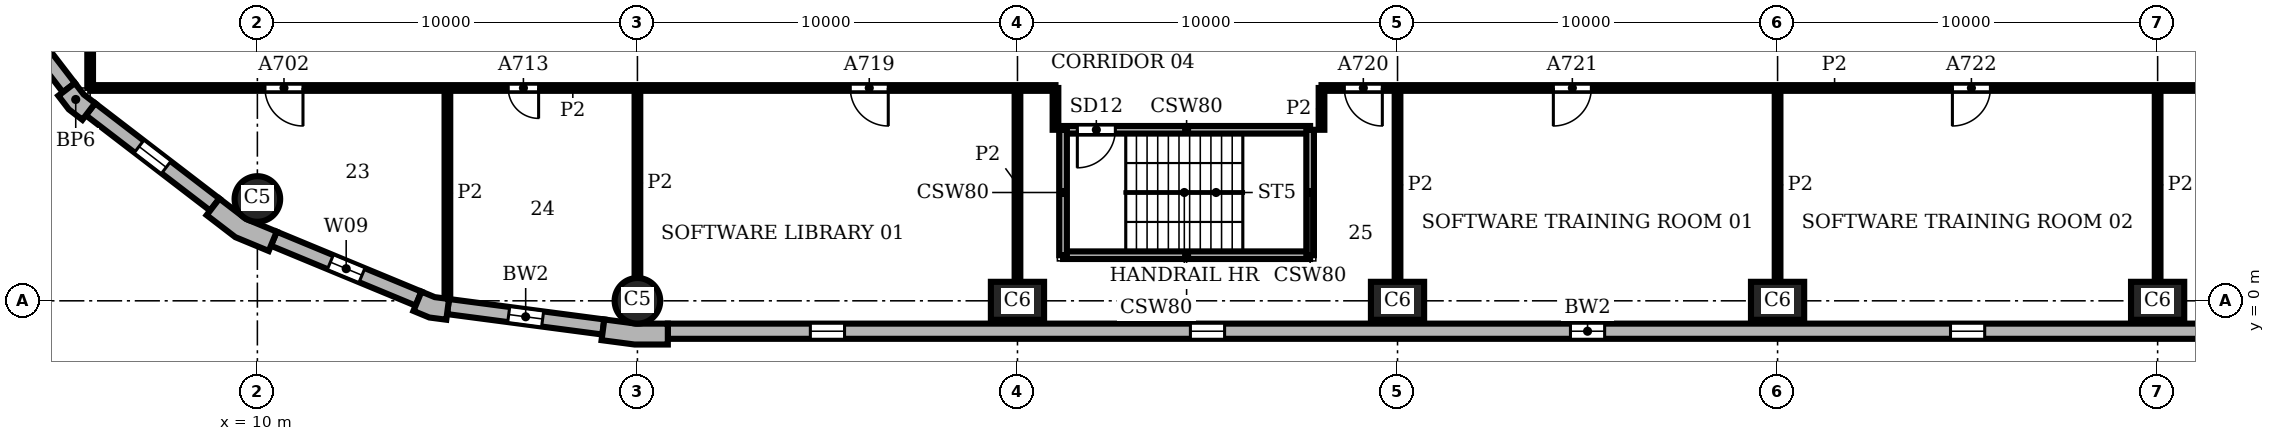
"""IFC4 building model, lengths in metres.
Left out: names, types, materials, properties, quantities, classifications, styles, units other than length and angle.
Written with IfcOpenShell. Run it as: python <this file> out.ifc"""

import sys

from ifc_helpers import new_model, si_unit, direction, frame, frame_2d, origin, origin_2d, place, context, subcontext, project, spatial, polyline, rectangle, circle, outline, extrude, element, fill, save


model = new_model("IFC4")
c1 = context("Model", 3, precision=1e-05, world=origin(), true_north=direction((0.0, 1.0)))
c2 = subcontext(c1, "Body", "Model", "MODEL_VIEW")
j1 = project(units=[si_unit("LENGTHUNIT", "METRE"), si_unit("PLANEANGLEUNIT", "RADIAN")], contexts=[c1])
p1 = place(None, origin())
s1 = spatial("IfcSite", under=j1, at=p1, CompositionType="ELEMENT")
p2 = place(p1, origin())
s2 = spatial("IfcBuilding", under=s1, at=p2, CompositionType="ELEMENT")
p3 = place(p2, frame((0.0, 0.0, 82.2)))
s3 = spatial("IfcBuildingStorey", under=s2, at=p3, CompositionType="ELEMENT", Elevation=82.2)
p4 = place(p3, frame((20.0, 0.0, 0.0), z_axis=(0.0, 0.0, 1.0), x_axis=(1.0, 0.0, 0.0)))
e1 = element("IfcColumn", 1, at=p4, inside=s3, PredefinedType="COLUMN", context=c2, shape_type="SweptSolid", body=[
    extrude(circle(Radius=0.6, at=origin_2d()), origin(), (0.0, 0.0, 1.0), 3.9),
])
for number, where, z_axis, x_axis in (
    (2, (30.0, 0.0, 0.0), (0.0, 0.0, 1.0), (1.0, 0.0, 0.0)),
    (3, (40.0, 0.0, 0.0), (0.0, 0.0, 1.0), (1.0, 0.0, 0.0)),
    (4, (50.0, 0.0, 0.0), (0.0, 0.0, 1.0), (1.0, 0.0, 0.0)),
    (5, (60.0, 0.0, 0.0), (0.0, 0.0, 1.0), (1.0, 0.0, 0.0)),
):
    element("IfcColumn", number, at=place(p3, frame(where, z_axis=z_axis, x_axis=x_axis)), inside=s3, PredefinedType="COLUMN", context=c2, shape_type="SweptSolid", body=[
        extrude(rectangle(XDim=1.4, YDim=1.0, at=origin_2d()), origin(), (0.0, 0.0, 1.0), 3.9),
    ])
p5 = place(p3, frame((10.0, 2.679, 0.0), z_axis=(0.0, 0.0, 1.0), x_axis=(1.0, 0.0, 0.0)))
e6 = element("IfcColumn", 6, at=p5, inside=s3, PredefinedType="COLUMN", context=c2, shape_type="SweptSolid", body=[
    extrude(circle(Radius=0.6, at=origin_2d()), origin(), (0.0, 0.0, 1.0), 3.9),
])
p6 = place(p3, origin())
e7 = element("IfcWall", 7, at=p6, inside=s3, PredefinedType="SOLIDWALL", context=c2, shape_type="SweptSolid", body=[
    extrude(outline(polyline([(19.076, -0.887), (19.057, -1.036), (19.925, -1.15), (20.8, -1.15), (20.8, -1.0), (20.8, -0.6), (19.961, -0.6), (19.128, -0.49), (19.076, -0.887)])), origin(), (0.0, 0.0, 1.0), 3.9),
])
e8 = element("IfcWall", 8, at=p6, inside=s3, PredefinedType="SOLIDWALL", context=c2, shape_type="SweptSolid", body=[
    extrude(outline(polyline([(4.882, 5.487), (4.763, 5.396), (5.038, 5.038), (5.396, 4.763), (5.487, 4.882), (5.731, 5.199), (5.43, 5.43), (5.199, 5.731), (4.882, 5.487)])), origin(), (0.0, 0.0, 1.0), 3.9),
])
e9 = element("IfcWall", 9, at=p6, inside=s3, PredefinedType="SOLIDWALL", context=c2, shape_type="SweptSolid", body=[
    extrude(outline(polyline([(8.757, 2.373), (8.665, 2.254), (9.42, 1.675), (10.299, 1.311), (10.356, 1.449), (10.51, 1.819), (9.698, 2.155), (9.0, 2.69), (8.757, 2.373)])), origin(), (0.0, 0.0, 1.0), 3.9),
])
e10 = element("IfcWall", 10, at=p6, inside=s3, PredefinedType="SOLIDWALL", context=c2, shape_type="SweptSolid", body=[
    extrude(outline(polyline([(14.164, -0.128), (14.106, -0.266), (14.523, -0.439), (14.971, -0.498), (14.99, -0.349), (15.043, 0.047), (14.667, 0.097), (14.317, 0.242), (14.164, -0.128)])), origin(), (0.0, 0.0, 1.0), 3.9),
])
p7 = place(p3, frame((20.8, -0.8, 0.0), z_axis=(0.0, 0.0, 1.0), x_axis=(1.0, 0.0, 0.0)))
e11 = element("IfcWall", 11, at=p7, inside=s3, PredefinedType="SOLIDWALL", context=c2, shape_type="SweptSolid", body=[
    extrude(rectangle(XDim=48.4, YDim=0.4, at=frame_2d((24.2, 0.0))), origin(), (0.0, 0.0, 1.0), 3.9),
])
p8 = place(p7, frame((3.75, 0.0, 0.9)))
e12 = element("IfcOpeningElement", 12, at=p8, cuts=e11, PredefinedType="OPENING", context=c2, shape_type="SweptSolid", body=[
    extrude(rectangle(XDim=0.9, YDim=2.35, at=frame_2d((0.45, 1.175))), frame((0.0, 0.21, 0.0), z_axis=(0.0, -1.0, 0.0), x_axis=(1.0, 0.0, 0.0)), (0.0, 0.0, 1.0), 0.42),
])
p9 = place(p7, frame((13.75, 0.0, 0.9)))
e13 = element("IfcOpeningElement", 13, at=p9, cuts=e11, PredefinedType="OPENING", context=c2, shape_type="SweptSolid", body=[
    extrude(rectangle(XDim=0.9, YDim=2.35, at=frame_2d((0.45, 1.175))), frame((0.0, 0.21, 0.0), z_axis=(0.0, -1.0, 0.0), x_axis=(1.0, 0.0, 0.0)), (0.0, 0.0, 1.0), 0.42),
])
p10 = place(p7, frame((23.75, 0.0, 0.9)))
e14 = element("IfcOpeningElement", 14, at=p10, cuts=e11, PredefinedType="OPENING", context=c2, shape_type="SweptSolid", body=[
    extrude(rectangle(XDim=0.9, YDim=2.35, at=frame_2d((0.45, 1.175))), frame((0.0, 0.21, 0.0), z_axis=(0.0, -1.0, 0.0), x_axis=(1.0, 0.0, 0.0)), (0.0, 0.0, 1.0), 0.42),
])
p11 = place(p7, frame((33.75, 0.0, 0.9)))
e15 = element("IfcOpeningElement", 15, at=p11, cuts=e11, PredefinedType="OPENING", context=c2, shape_type="SweptSolid", body=[
    extrude(rectangle(XDim=0.9, YDim=2.35, at=frame_2d((0.45, 1.175))), frame((0.0, 0.21, 0.0), z_axis=(0.0, -1.0, 0.0), x_axis=(1.0, 0.0, 0.0)), (0.0, 0.0, 1.0), 0.42),
])
p12 = place(p7, frame((43.75, 0.0, 0.9)))
e16 = element("IfcOpeningElement", 16, at=p12, cuts=e11, PredefinedType="OPENING", context=c2, shape_type="SweptSolid", body=[
    extrude(rectangle(XDim=0.9, YDim=2.35, at=frame_2d((0.45, 1.175))), frame((0.0, 0.21, 0.0), z_axis=(0.0, -1.0, 0.0), x_axis=(1.0, 0.0, 0.0)), (0.0, 0.0, 1.0), 0.42),
])
p13 = place(p3, frame((2.532, 8.878, 0.0), z_axis=(0.0, 0.0, 1.0), x_axis=(0.608759824817, -0.793354571229, 0.0)))
e17 = element("IfcWall", 17, at=p13, inside=s3, PredefinedType="SOLIDWALL", context=c2, shape_type="SweptSolid", body=[
    extrude(rectangle(XDim=4.121, YDim=0.4, at=frame_2d((2.061, 0.0))), origin(), (0.0, 0.0, 1.0), 3.9),
])
p14 = place(p13, frame((1.611, 0.0, 0.9)))
e18 = element("IfcOpeningElement", 18, at=p14, cuts=e17, PredefinedType="OPENING", context=c2, shape_type="SweptSolid", body=[
    extrude(rectangle(XDim=0.9, YDim=2.35, at=frame_2d((0.45, 1.175))), frame((0.0, 0.21, 0.0), z_axis=(0.0, -1.0, 0.0), x_axis=(1.0, 0.0, 0.0)), (0.0, 0.0, 1.0), 0.42),
])
p15 = place(p3, frame((5.609, 5.041, 0.0), z_axis=(0.0, 0.0, 1.0), x_axis=(0.793354571229, -0.608759824817, 0.0)))
e19 = element("IfcWall", 19, at=p15, inside=s3, PredefinedType="SOLIDWALL", context=c2, shape_type="SweptSolid", body=[
    extrude(rectangle(XDim=4.121, YDim=0.4, at=frame_2d((2.061, 0.0))), origin(), (0.0, 0.0, 1.0), 3.9),
])
p16 = place(p15, frame((1.611, 0.0, 0.9)))
e20 = element("IfcOpeningElement", 20, at=p16, cuts=e19, PredefinedType="OPENING", context=c2, shape_type="SweptSolid", body=[
    extrude(rectangle(XDim=0.9, YDim=2.35, at=frame_2d((0.45, 1.175))), frame((0.0, 0.21, 0.0), z_axis=(0.0, -1.0, 0.0), x_axis=(1.0, 0.0, 0.0)), (0.0, 0.0, 1.0), 0.42),
])
p17 = place(p3, frame((10.433, 1.634, 0.0), z_axis=(0.0, 0.0, 1.0), x_axis=(0.923863744394, -0.382721546029, 0.0)))
e21 = element("IfcWall", 21, at=p17, inside=s3, PredefinedType="SOLIDWALL", context=c2, shape_type="SweptSolid", body=[
    extrude(rectangle(XDim=4.121, YDim=0.4, at=frame_2d((2.061, 0.0))), origin(), (0.0, 0.0, 1.0), 3.9),
])
p18 = place(p17, frame((1.611, 0.0, 0.9)))
e22 = element("IfcOpeningElement", 22, at=p18, cuts=e21, PredefinedType="OPENING", context=c2, shape_type="SweptSolid", body=[
    extrude(rectangle(XDim=0.9, YDim=2.35, at=frame_2d((0.45, 1.175))), frame((0.0, 0.21, 0.0), z_axis=(0.0, -1.0, 0.0), x_axis=(1.0, 0.0, 0.0)), (0.0, 0.0, 1.0), 0.42),
])
p19 = place(p3, frame((15.017, -0.151, 0.0), z_axis=(0.0, 0.0, 1.0), x_axis=(0.991446429508, -0.130514280502, 0.0)))
e23 = element("IfcWall", 23, at=p19, inside=s3, PredefinedType="SOLIDWALL", context=c2, shape_type="SweptSolid", body=[
    extrude(rectangle(XDim=4.121, YDim=0.4, at=frame_2d((2.061, 0.0))), origin(), (0.0, 0.0, 1.0), 3.9),
])
p20 = place(p19, frame((1.611, 0.0, 0.9)))
e24 = element("IfcOpeningElement", 24, at=p20, cuts=e23, PredefinedType="OPENING", context=c2, shape_type="SweptSolid", body=[
    extrude(rectangle(XDim=0.9, YDim=2.35, at=frame_2d((0.45, 1.175))), frame((0.0, 0.21, 0.0), z_axis=(0.0, -1.0, 0.0), x_axis=(1.0, 0.0, 0.0)), (0.0, 0.0, 1.0), 0.42),
])
p21 = place(p3, frame((31.2, 1.2, 0.0), z_axis=(0.0, 0.0, 1.0), x_axis=(1.0, 0.0, 0.0)))
e25 = element("IfcWall", 25, at=p21, inside=s3, PredefinedType="SHEAR", context=c2, shape_type="SweptSolid", body=[
    extrude(rectangle(XDim=6.5, YDim=0.2, at=frame_2d((3.25, 0.0))), origin(), (0.0, 0.0, 1.0), 3.58),
])
p22 = place(p3, frame((31.2, 4.5, 0.0), z_axis=(0.0, 0.0, 1.0), x_axis=(1.0, 0.0, 0.0)))
e26 = element("IfcWall", 26, at=p22, inside=s3, PredefinedType="SHEAR", context=c2, shape_type="SweptSolid", body=[
    extrude(rectangle(XDim=6.5, YDim=0.2, at=frame_2d((3.25, 0.0))), origin(), (0.0, 0.0, 1.0), 3.58),
])
p23 = place(p22, frame((0.375, 0.0, 0.0)))
e27 = element("IfcOpeningElement", 27, at=p23, cuts=e26, PredefinedType="OPENING", context=c2, shape_type="SweptSolid", body=[
    extrude(rectangle(XDim=1.0, YDim=2.1, at=frame_2d((0.5, 1.05))), frame((0.0, 0.11, 0.0), z_axis=(0.0, -1.0, 0.0), x_axis=(1.0, 0.0, 0.0)), (0.0, 0.0, 1.0), 0.22),
])
for number, where, z_axis, x_axis in (
    (28, (31.2, 1.2, 0.0), (0.0, 0.0, 1.0), (0.0, 1.0, 0.0)),
    (29, (37.7, 1.2, 0.0), (0.0, 0.0, 1.0), (0.0, 1.0, 0.0)),
):
    element("IfcWall", number, at=place(p3, frame(where, z_axis=z_axis, x_axis=x_axis)), inside=s3, PredefinedType="SHEAR", context=c2, shape_type="SweptSolid", body=[
        extrude(rectangle(XDim=3.3, YDim=0.2, at=frame_2d((1.65, 0.0))), origin(), (0.0, 0.0, 1.0), 3.58),
    ])
p24 = place(p3, frame((5.6, 5.6, 0.0), z_axis=(0.0, 0.0, 1.0), x_axis=(0.0, 1.0, 0.0)))
e30 = element("IfcWall", 30, at=p24, inside=s3, PredefinedType="PARTITIONING", context=c2, shape_type="SweptSolid", body=[
    extrude(rectangle(XDim=54.4, YDim=0.15, at=frame_2d((27.2, 0.0))), origin(), (0.0, 0.0, 1.0), 3.58),
])
p25 = place(p24, frame((40.8, 0.0, 0.0)))
e31 = element("IfcOpeningElement", 31, at=p25, cuts=e30, PredefinedType="OPENING", context=c2, shape_type="SweptSolid", body=[
    extrude(rectangle(XDim=1.8, YDim=2.1, at=frame_2d((0.9, 1.05))), frame((0.0, 0.085, 0.0), z_axis=(0.0, -1.0, 0.0), x_axis=(1.0, 0.0, 0.0)), (0.0, 0.0, 1.0), 0.17),
])
p26 = place(p3, frame((15.0, 0.063, 0.0), z_axis=(0.0, 0.0, 1.0), x_axis=(0.0, 1.0, 0.0)))
e32 = element("IfcWall", 32, at=p26, inside=s3, PredefinedType="PARTITIONING", context=c2, shape_type="SweptSolid", body=[
    extrude(rectangle(XDim=5.537, YDim=0.15, at=frame_2d((2.769, 0.0))), origin(), (0.0, 0.0, 1.0), 3.58),
])
p27 = place(p3, frame((20.0, 0.6, 0.0), z_axis=(0.0, 0.0, 1.0), x_axis=(0.0, 1.0, 0.0)))
e33 = element("IfcWall", 33, at=p27, inside=s3, PredefinedType="PARTITIONING", context=c2, shape_type="SweptSolid", body=[
    extrude(rectangle(XDim=5.0, YDim=0.15, at=frame_2d((2.5, 0.0))), origin(), (0.0, 0.0, 1.0), 3.58),
])
p28 = place(p3, frame((30.0, 0.5, 0.0), z_axis=(0.0, 0.0, 1.0), x_axis=(0.0, 1.0, 0.0)))
e34 = element("IfcWall", 34, at=p28, inside=s3, PredefinedType="PARTITIONING", context=c2, shape_type="SweptSolid", body=[
    extrude(rectangle(XDim=5.1, YDim=0.15, at=frame_2d((2.55, 0.0))), origin(), (0.0, 0.0, 1.0), 3.58),
])
for number, where, z_axis, x_axis in (
    (35, (31.0, 4.5, 0.0), (0.0, 0.0, 1.0), (0.0, 1.0, 0.0)),
    (36, (38.0, 4.5, 0.0), (0.0, 0.0, 1.0), (0.0, 1.0, 0.0)),
):
    element("IfcWall", number, at=place(p3, frame(where, z_axis=z_axis, x_axis=x_axis)), inside=s3, PredefinedType="PARTITIONING", context=c2, shape_type="SweptSolid", body=[
        extrude(rectangle(XDim=1.1, YDim=0.15, at=frame_2d((0.55, 0.0))), origin(), (0.0, 0.0, 1.0), 3.58),
    ])
for number, where, z_axis, x_axis in (
    (37, (40.0, 0.5, 0.0), (0.0, 0.0, 1.0), (0.0, 1.0, 0.0)),
    (38, (50.0, 0.5, 0.0), (0.0, 0.0, 1.0), (0.0, 1.0, 0.0)),
    (39, (60.0, 0.5, 0.0), (0.0, 0.0, 1.0), (0.0, 1.0, 0.0)),
):
    element("IfcWall", number, at=place(p3, frame(where, z_axis=z_axis, x_axis=x_axis)), inside=s3, PredefinedType="PARTITIONING", context=c2, shape_type="SweptSolid", body=[
        extrude(rectangle(XDim=5.1, YDim=0.15, at=frame_2d((2.55, 0.0))), origin(), (0.0, 0.0, 1.0), 3.58),
    ])
p29 = place(p3, frame((5.6, 5.6, 0.0), z_axis=(0.0, 0.0, 1.0), x_axis=(1.0, 0.0, 0.0)))
e40 = element("IfcWall", 40, at=p29, inside=s3, PredefinedType="PARTITIONING", context=c2, shape_type="SweptSolid", body=[
    extrude(rectangle(XDim=25.4, YDim=0.15, at=frame_2d((12.7, 0.0))), origin(), (0.0, 0.0, 1.0), 3.58),
])
p30 = place(p29, frame((4.6, 0.0, 0.0)))
e41 = element("IfcOpeningElement", 41, at=p30, cuts=e40, PredefinedType="OPENING", context=c2, shape_type="SweptSolid", body=[
    extrude(rectangle(XDim=1.0, YDim=2.1, at=frame_2d((0.5, 1.05))), frame((0.0, 0.085, 0.0), z_axis=(0.0, -1.0, 0.0), x_axis=(1.0, 0.0, 0.0)), (0.0, 0.0, 1.0), 0.17),
])
p31 = place(p29, frame((11.0, 0.0, 0.0)))
e42 = element("IfcOpeningElement", 42, at=p31, cuts=e40, PredefinedType="OPENING", context=c2, shape_type="SweptSolid", body=[
    extrude(rectangle(XDim=0.8, YDim=2.1, at=frame_2d((0.4, 1.05))), frame((0.0, 0.085, 0.0), z_axis=(0.0, -1.0, 0.0), x_axis=(1.0, 0.0, 0.0)), (0.0, 0.0, 1.0), 0.17),
])
p32 = place(p29, frame((20.0, 0.0, 0.0)))
e43 = element("IfcOpeningElement", 43, at=p32, cuts=e40, PredefinedType="OPENING", context=c2, shape_type="SweptSolid", body=[
    extrude(rectangle(XDim=1.0, YDim=2.1, at=frame_2d((0.5, 1.05))), frame((0.0, 0.085, 0.0), z_axis=(0.0, -1.0, 0.0), x_axis=(1.0, 0.0, 0.0)), (0.0, 0.0, 1.0), 0.17),
])
p33 = place(p3, frame((38.0, 5.6, 0.0), z_axis=(0.0, 0.0, 1.0), x_axis=(1.0, 0.0, 0.0)))
e44 = element("IfcWall", 44, at=p33, inside=s3, PredefinedType="PARTITIONING", context=c2, shape_type="SweptSolid", body=[
    extrude(rectangle(XDim=27.0, YDim=0.15, at=frame_2d((13.5, 0.0))), origin(), (0.0, 0.0, 1.0), 3.58),
])
p34 = place(p33, frame((0.6, 0.0, 0.0)))
e45 = element("IfcOpeningElement", 45, at=p34, cuts=e44, PredefinedType="OPENING", context=c2, shape_type="SweptSolid", body=[
    extrude(rectangle(XDim=1.0, YDim=2.1, at=frame_2d((0.5, 1.05))), frame((0.0, 0.085, 0.0), z_axis=(0.0, -1.0, 0.0), x_axis=(1.0, 0.0, 0.0)), (0.0, 0.0, 1.0), 0.17),
])
p35 = place(p33, frame((6.1, 0.0, 0.0)))
e46 = element("IfcOpeningElement", 46, at=p35, cuts=e44, PredefinedType="OPENING", context=c2, shape_type="SweptSolid", body=[
    extrude(rectangle(XDim=1.0, YDim=2.1, at=frame_2d((0.5, 1.05))), frame((0.0, 0.085, 0.0), z_axis=(0.0, -1.0, 0.0), x_axis=(1.0, 0.0, 0.0)), (0.0, 0.0, 1.0), 0.17),
])
p36 = place(p33, frame((16.6, 0.0, 0.0)))
e47 = element("IfcOpeningElement", 47, at=p36, cuts=e44, PredefinedType="OPENING", context=c2, shape_type="SweptSolid", body=[
    extrude(rectangle(XDim=1.0, YDim=2.1, at=frame_2d((0.5, 1.05))), frame((0.0, 0.085, 0.0), z_axis=(0.0, -1.0, 0.0), x_axis=(1.0, 0.0, 0.0)), (0.0, 0.0, 1.0), 0.17),
])
p37 = place(p8, origin())
e48 = element("IfcWindow", 48, at=p37, inside=s3, PartitioningType="SINGLE_PANEL", PredefinedType="WINDOW", context=c2, shape_type="SweptSolid", body=[
    extrude(rectangle(XDim=0.9, YDim=2.35, at=frame_2d((0.45, 1.175))), frame((0.0, 0.16, 0.0), z_axis=(0.0, -1.0, 0.0), x_axis=(1.0, 0.0, 0.0)), (0.0, 0.0, 1.0), 0.06),
])
fill(e12, e48)
p38 = place(p9, origin())
e49 = element("IfcWindow", 49, at=p38, inside=s3, PartitioningType="SINGLE_PANEL", PredefinedType="WINDOW", context=c2, shape_type="SweptSolid", body=[
    extrude(rectangle(XDim=0.9, YDim=2.35, at=frame_2d((0.45, 1.175))), frame((0.0, 0.16, 0.0), z_axis=(0.0, -1.0, 0.0), x_axis=(1.0, 0.0, 0.0)), (0.0, 0.0, 1.0), 0.06),
])
fill(e13, e49)
p39 = place(p10, origin())
e50 = element("IfcWindow", 50, at=p39, inside=s3, PartitioningType="SINGLE_PANEL", PredefinedType="WINDOW", context=c2, shape_type="SweptSolid", body=[
    extrude(rectangle(XDim=0.9, YDim=2.35, at=frame_2d((0.45, 1.175))), frame((0.0, 0.16, 0.0), z_axis=(0.0, -1.0, 0.0), x_axis=(1.0, 0.0, 0.0)), (0.0, 0.0, 1.0), 0.06),
])
fill(e14, e50)
p40 = place(p11, origin())
e51 = element("IfcWindow", 51, at=p40, inside=s3, PartitioningType="SINGLE_PANEL", PredefinedType="WINDOW", context=c2, shape_type="SweptSolid", body=[
    extrude(rectangle(XDim=0.9, YDim=2.35, at=frame_2d((0.45, 1.175))), frame((0.0, 0.16, 0.0), z_axis=(0.0, -1.0, 0.0), x_axis=(1.0, 0.0, 0.0)), (0.0, 0.0, 1.0), 0.06),
])
fill(e15, e51)
p41 = place(p16, origin())
e52 = element("IfcWindow", 52, at=p41, inside=s3, PartitioningType="SINGLE_PANEL", PredefinedType="WINDOW", context=c2, shape_type="SweptSolid", body=[
    extrude(rectangle(XDim=0.9, YDim=2.35, at=frame_2d((0.45, 1.175))), frame((0.0, 0.16, 0.0), z_axis=(0.0, -1.0, 0.0), x_axis=(1.0, 0.0, 0.0)), (0.0, 0.0, 1.0), 0.06),
])
fill(e20, e52)
p42 = place(p18, origin())
e53 = element("IfcWindow", 53, at=p42, inside=s3, PartitioningType="SINGLE_PANEL", PredefinedType="WINDOW", context=c2, shape_type="SweptSolid", body=[
    extrude(rectangle(XDim=0.9, YDim=2.35, at=frame_2d((0.45, 1.175))), frame((0.0, 0.16, 0.0), z_axis=(0.0, -1.0, 0.0), x_axis=(1.0, 0.0, 0.0)), (0.0, 0.0, 1.0), 0.06),
])
fill(e22, e53)
p43 = place(p20, origin())
e54 = element("IfcWindow", 54, at=p43, inside=s3, PartitioningType="SINGLE_PANEL", PredefinedType="WINDOW", context=c2, shape_type="SweptSolid", body=[
    extrude(rectangle(XDim=0.9, YDim=2.35, at=frame_2d((0.45, 1.175))), frame((0.0, 0.16, 0.0), z_axis=(0.0, -1.0, 0.0), x_axis=(1.0, 0.0, 0.0)), (0.0, 0.0, 1.0), 0.06),
])
fill(e24, e54)
p44 = place(p23, frame((1.0, 0.0, 0.0), z_axis=(0.0, 0.0, 1.0), x_axis=(-1.0, 0.0, 0.0)))
e55 = element("IfcDoor", 55, at=p44, inside=s3, OperationType="SINGLE_SWING_RIGHT", PredefinedType="DOOR", context=c2, shape_type="SweptSolid", body=[
    extrude(rectangle(XDim=1.0, YDim=2.1, at=frame_2d((0.5, 1.05))), frame((0.0, 0.025, 0.0), z_axis=(0.0, -1.0, 0.0), x_axis=(1.0, 0.0, 0.0)), (0.0, 0.0, 1.0), 0.05),
])
fill(e27, e55)
p45 = place(p30, frame((1.0, 0.0, 0.0), z_axis=(0.0, 0.0, 1.0), x_axis=(-1.0, 0.0, 0.0)))
e56 = element("IfcDoor", 56, at=p45, inside=s3, OperationType="SINGLE_SWING_LEFT", PredefinedType="DOOR", context=c2, shape_type="SweptSolid", body=[
    extrude(rectangle(XDim=1.0, YDim=2.1, at=frame_2d((0.5, 1.05))), frame((0.0, 0.025, 0.0), z_axis=(0.0, -1.0, 0.0), x_axis=(1.0, 0.0, 0.0)), (0.0, 0.0, 1.0), 0.05),
])
fill(e41, e56)
p46 = place(p31, frame((0.8, 0.0, 0.0), z_axis=(0.0, 0.0, 1.0), x_axis=(-1.0, 0.0, 0.0)))
e57 = element("IfcDoor", 57, at=p46, inside=s3, OperationType="SINGLE_SWING_LEFT", PredefinedType="DOOR", context=c2, shape_type="SweptSolid", body=[
    extrude(rectangle(XDim=0.8, YDim=2.1, at=frame_2d((0.4, 1.05))), frame((0.0, 0.025, 0.0), z_axis=(0.0, -1.0, 0.0), x_axis=(1.0, 0.0, 0.0)), (0.0, 0.0, 1.0), 0.05),
])
fill(e42, e57)
p47 = place(p32, frame((1.0, 0.0, 0.0), z_axis=(0.0, 0.0, 1.0), x_axis=(-1.0, 0.0, 0.0)))
e58 = element("IfcDoor", 58, at=p47, inside=s3, OperationType="SINGLE_SWING_LEFT", PredefinedType="DOOR", context=c2, shape_type="SweptSolid", body=[
    extrude(rectangle(XDim=1.0, YDim=2.1, at=frame_2d((0.5, 1.05))), frame((0.0, 0.025, 0.0), z_axis=(0.0, -1.0, 0.0), x_axis=(1.0, 0.0, 0.0)), (0.0, 0.0, 1.0), 0.05),
])
fill(e43, e58)
p48 = place(p34, frame((1.0, 0.0, 0.0), z_axis=(0.0, 0.0, 1.0), x_axis=(-1.0, 0.0, 0.0)))
e59 = element("IfcDoor", 59, at=p48, inside=s3, OperationType="SINGLE_SWING_LEFT", PredefinedType="DOOR", context=c2, shape_type="SweptSolid", body=[
    extrude(rectangle(XDim=1.0, YDim=2.1, at=frame_2d((0.5, 1.05))), frame((0.0, 0.025, 0.0), z_axis=(0.0, -1.0, 0.0), x_axis=(1.0, 0.0, 0.0)), (0.0, 0.0, 1.0), 0.05),
])
fill(e45, e59)
p49 = place(p35, frame((1.0, 0.0, 0.0), z_axis=(0.0, 0.0, 1.0), x_axis=(-1.0, 0.0, 0.0)))
e60 = element("IfcDoor", 60, at=p49, inside=s3, OperationType="SINGLE_SWING_RIGHT", PredefinedType="DOOR", context=c2, shape_type="SweptSolid", body=[
    extrude(rectangle(XDim=1.0, YDim=2.1, at=frame_2d((0.5, 1.05))), frame((0.0, 0.025, 0.0), z_axis=(0.0, -1.0, 0.0), x_axis=(1.0, 0.0, 0.0)), (0.0, 0.0, 1.0), 0.05),
])
fill(e46, e60)
p50 = place(p36, frame((1.0, 0.0, 0.0), z_axis=(0.0, 0.0, 1.0), x_axis=(-1.0, 0.0, 0.0)))
e61 = element("IfcDoor", 61, at=p50, inside=s3, OperationType="SINGLE_SWING_RIGHT", PredefinedType="DOOR", context=c2, shape_type="SweptSolid", body=[
    extrude(rectangle(XDim=1.0, YDim=2.1, at=frame_2d((0.5, 1.05))), frame((0.0, 0.025, 0.0), z_axis=(0.0, -1.0, 0.0), x_axis=(1.0, 0.0, 0.0)), (0.0, 0.0, 1.0), 0.05),
])
fill(e47, e61)
save(model, sys.argv[1])
